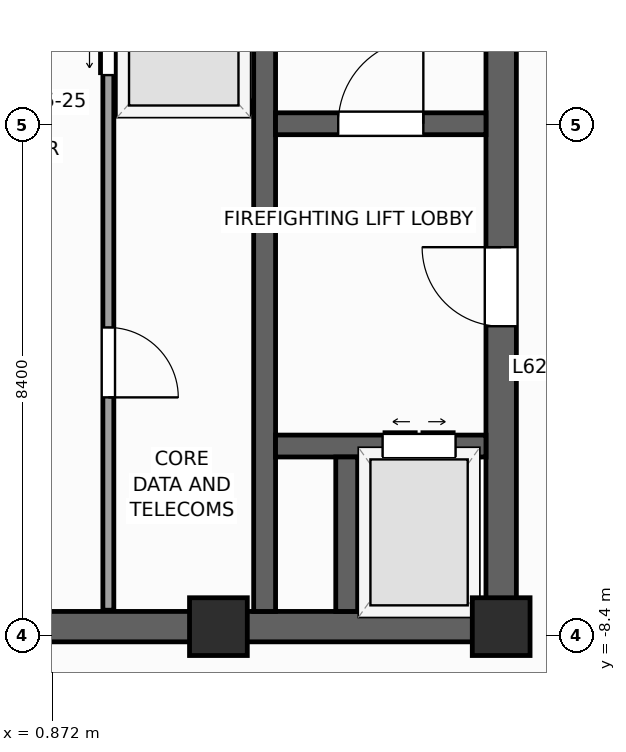
"""IFC4 building model, lengths in metres.
Left out: names, types, materials, properties, quantities, classifications, styles, units other than length and angle.
Written with IfcOpenShell. Run it as: python <this file> out.ifc"""

import sys

from ifc_helpers import new_model, si_unit, direction, frame, frame_2d, origin, origin_2d, place, context, subcontext, project, spatial, rectangle, extrude, source, transform, mapped, element, fill, save


model = new_model("IFC4")
c1 = context("Model", 3, precision=1e-05, world=origin(), true_north=direction((0.0, 1.0)))
c2 = subcontext(c1, "Body", "Model", "MODEL_VIEW")
j1 = project(units=[si_unit("LENGTHUNIT", "METRE"), si_unit("PLANEANGLEUNIT", "RADIAN")], contexts=[c1])
p1 = place(None, origin())
s1 = spatial("IfcSite", under=j1, at=p1, CompositionType="ELEMENT")
p2 = place(p1, origin())
s2 = spatial("IfcBuilding", under=s1, at=p2, CompositionType="ELEMENT")
p3 = place(p2, frame((0.0, 0.0, 256.3)))
s3 = spatial("IfcBuildingStorey", under=s2, at=p3, CompositionType="ELEMENT", Elevation=256.3)
p4 = place(p3, frame((-8.5, -8.25, 0.0), z_axis=(0.0, 0.0, 1.0), x_axis=(1.0, 0.0, 0.0)))
e1 = element("IfcWall", 1, at=p4, inside=s3, PredefinedType="SHEAR", context=c2, shape_type="SweptSolid", body=[
    extrude(rectangle(XDim=17.0, YDim=0.5, at=frame_2d((8.5, 0.0))), origin(), (0.0, 0.0, 1.0), 3.9),
])
p5 = place(p4, frame((7.85, 0.0, 0.0)))
e2 = element("IfcOpeningElement", 2, at=p5, cuts=e1, PredefinedType="OPENING", context=c2, shape_type="SweptSolid", body=[
    extrude(rectangle(XDim=1.3, YDim=2.2, at=frame_2d((0.65, 1.1))), frame((0.0, 0.26, 0.0), z_axis=(0.0, -1.0, 0.0), x_axis=(1.0, 0.0, 0.0)), (0.0, 0.0, 1.0), 0.52),
])
p6 = place(p3, frame((8.25, -8.0, 0.0), z_axis=(0.0, 0.0, 1.0), x_axis=(0.0, 1.0, 0.0)))
e3 = element("IfcWall", 3, at=p6, inside=s3, PredefinedType="SHEAR", context=c2, shape_type="SweptSolid", body=[
    extrude(rectangle(XDim=16.0, YDim=0.5, at=frame_2d((8.0, 0.0))), origin(), (0.0, 0.0, 1.0), 3.9),
])
p7 = place(p6, frame((4.69, 0.0, 0.0)))
e4 = element("IfcOpeningElement", 4, at=p7, cuts=e3, PredefinedType="OPENING", context=c2, shape_type="SweptSolid", body=[
    extrude(rectangle(XDim=1.3, YDim=2.2, at=frame_2d((0.65, 1.1))), frame((0.0, 0.26, 0.0), z_axis=(0.0, -1.0, 0.0), x_axis=(1.0, 0.0, 0.0)), (0.0, 0.0, 1.0), 0.52),
])
p8 = place(p3, frame((4.36, -8.0, 0.0), z_axis=(0.0, 0.0, 1.0), x_axis=(0.0, 1.0, 0.0)))
e5 = element("IfcWall", 5, at=p8, inside=s3, PredefinedType="SHEAR", context=c2, shape_type="SweptSolid", body=[
    extrude(rectangle(XDim=16.0, YDim=0.36, at=frame_2d((8.0, 0.0))), origin(), (0.0, 0.0, 1.0), 3.9),
])
p9 = place(p3, frame((4.54, 0.02, 0.0), z_axis=(0.0, 0.0, 1.0), x_axis=(1.0, 0.0, 0.0)))
e6 = element("IfcWall", 6, at=p9, inside=s3, PredefinedType="SHEAR", context=c2, shape_type="SweptSolid", body=[
    extrude(rectangle(XDim=3.46, YDim=0.36, at=frame_2d((1.73, 0.0))), origin(), (0.0, 0.0, 1.0), 3.9),
])
p10 = place(p9, frame((1.03, 0.0, 0.0)))
e7 = element("IfcOpeningElement", 7, at=p10, cuts=e6, PredefinedType="OPENING", context=c2, shape_type="SweptSolid", body=[
    extrude(rectangle(XDim=1.4, YDim=2.2, at=frame_2d((0.7, 1.1))), frame((0.0, 0.19, 0.0), z_axis=(0.0, -1.0, 0.0), x_axis=(1.0, 0.0, 0.0)), (0.0, 0.0, 1.0), 0.38),
])
p11 = place(p3, frame((4.54, -5.28, 0.0), z_axis=(0.0, 0.0, 1.0), x_axis=(1.0, 0.0, 0.0)))
e8 = element("IfcWall", 8, at=p11, inside=s3, PredefinedType="SHEAR", context=c2, shape_type="SweptSolid", body=[
    extrude(rectangle(XDim=3.46, YDim=0.36, at=frame_2d((1.73, 0.0))), origin(), (0.0, 0.0, 1.0), 3.9),
])
p12 = place(p11, frame((1.76, 0.0, 0.0)))
e9 = element("IfcOpeningElement", 9, at=p12, cuts=e8, PredefinedType="OPENING", context=c2, shape_type="SweptSolid", body=[
    extrude(rectangle(XDim=1.2, YDim=2.25, at=frame_2d((0.6, 1.125))), frame((0.0, 0.19, 0.0), z_axis=(0.0, -1.0, 0.0), x_axis=(1.0, 0.0, 0.0)), (0.0, 0.0, 1.0), 0.38),
])
p13 = place(p3, frame((5.71, -8.0, 0.0), z_axis=(0.0, 0.0, 1.0), x_axis=(0.0, 1.0, 0.0)))
e10 = element("IfcWall", 10, at=p13, inside=s3, PredefinedType="SHEAR", context=c2, shape_type="SweptSolid", body=[
    extrude(rectangle(XDim=2.54, YDim=0.36, at=frame_2d((1.27, 0.0))), origin(), (0.0, 0.0, 1.0), 3.9),
])
m1 = source(origin(), c2, "Body", "SweptSolid", [
    extrude(rectangle(XDim=0.95, YDim=0.95, at=origin_2d()), origin(), (0.0, 0.0, 1.0), 3.9),
])
for number, where, z_axis, x_axis in (
    (11, (8.25, -8.25, 0.0), (0.0, 0.0, 1.0), (1.0, 0.0, 0.0)),
    (12, (3.6, -8.25, 0.0), (0.0, 0.0, 1.0), (1.0, 0.0, 0.0)),
):
    element("IfcColumn", number, at=place(p3, frame(where, z_axis=z_axis, x_axis=x_axis)), inside=s3, PredefinedType="PILASTER", context=c2, shape_type="MappedRepresentation", body=[
        mapped(m1, transform((0.0, 0.0, 0.0), scale=1.0)),
    ])
p14 = place(p3, frame((6.733, -29.154, 0.0), z_axis=(0.0, 0.0, 1.0), x_axis=(0.629325378072, 0.77714192302, 0.0)))
e13 = element("IfcWall", 13, at=p14, inside=s3, PredefinedType="STANDARD", context=c2, shape_type="SweptSolid", body=[
    extrude(rectangle(XDim=36.84, YDim=0.34, at=frame_2d((18.42, 0.0))), origin(), (0.0, 0.0, 1.0), 2.02),
])
p15 = place(p14, frame((23.495, 0.0, 0.0)))
e14 = element("IfcOpeningElement", 14, at=p15, cuts=e13, PredefinedType="OPENING", context=c2, shape_type="SweptSolid", body=[
    extrude(rectangle(XDim=1.05, YDim=2.02, at=frame_2d((0.525, 1.01))), frame((0.0, 0.18, 0.0), z_axis=(0.0, -1.0, 0.0), x_axis=(1.0, 0.0, 0.0)), (0.0, 0.0, 1.0), 0.36),
])
p16 = place(p14, frame((3.421, 0.0, 0.49)))
e15 = element("IfcOpeningElement", 15, at=p16, cuts=e13, PredefinedType="OPENING", context=c2, shape_type="SweptSolid", body=[
    extrude(rectangle(XDim=2.0, YDim=1.45, at=frame_2d((1.0, 0.725))), frame((0.0, 0.18, 0.0), z_axis=(0.0, -1.0, 0.0), x_axis=(1.0, 0.0, 0.0)), (0.0, 0.0, 1.0), 0.36),
])
p17 = place(p14, frame((11.184, 0.0, 0.49)))
e16 = element("IfcOpeningElement", 16, at=p17, cuts=e13, PredefinedType="OPENING", context=c2, shape_type="SweptSolid", body=[
    extrude(rectangle(XDim=2.0, YDim=1.45, at=frame_2d((1.0, 0.725))), frame((0.0, 0.18, 0.0), z_axis=(0.0, -1.0, 0.0), x_axis=(1.0, 0.0, 0.0)), (0.0, 0.0, 1.0), 0.36),
])
p18 = place(p14, frame((15.183, 0.0, 0.49)))
e17 = element("IfcOpeningElement", 17, at=p18, cuts=e13, PredefinedType="OPENING", context=c2, shape_type="SweptSolid", body=[
    extrude(rectangle(XDim=2.0, YDim=1.45, at=frame_2d((1.0, 0.725))), frame((0.0, 0.18, 0.0), z_axis=(0.0, -1.0, 0.0), x_axis=(1.0, 0.0, 0.0)), (0.0, 0.0, 1.0), 0.36),
])
p19 = place(p14, frame((26.301, 0.0, 0.49)))
e18 = element("IfcOpeningElement", 18, at=p19, cuts=e13, PredefinedType="OPENING", context=c2, shape_type="SweptSolid", body=[
    extrude(rectangle(XDim=2.0, YDim=1.45, at=frame_2d((1.0, 0.725))), frame((0.0, 0.18, 0.0), z_axis=(0.0, -1.0, 0.0), x_axis=(1.0, 0.0, 0.0)), (0.0, 0.0, 1.0), 0.36),
])
p20 = place(p14, frame((30.682, 0.0, 0.49)))
e19 = element("IfcOpeningElement", 19, at=p20, cuts=e13, PredefinedType="OPENING", context=c2, shape_type="SweptSolid", body=[
    extrude(rectangle(XDim=2.0, YDim=1.45, at=frame_2d((1.0, 0.725))), frame((0.0, 0.18, 0.0), z_axis=(0.0, -1.0, 0.0), x_axis=(1.0, 0.0, 0.0)), (0.0, 0.0, 1.0), 0.36),
])
p21 = place(p3, frame((1.79, -7.98, 0.0), z_axis=(0.0, 0.0, 1.0), x_axis=(0.0, 1.0, 0.0)))
e20 = element("IfcWall", 20, at=p21, inside=s3, PredefinedType="PARTITIONING", context=c2, shape_type="SweptSolid", body=[
    extrude(rectangle(XDim=12.38, YDim=0.18, at=frame_2d((6.19, 0.0))), origin(), (0.0, 0.0, 1.0), 3.5),
])
p22 = place(p21, frame((8.8, 0.0, 0.0)))
e21 = element("IfcOpeningElement", 21, at=p22, cuts=e20, PredefinedType="OPENING", context=c2, shape_type="SweptSolid", body=[
    extrude(rectangle(XDim=1.1, YDim=2.2, at=frame_2d((0.55, 1.1))), frame((0.0, 0.1, 0.0), z_axis=(0.0, -1.0, 0.0), x_axis=(1.0, 0.0, 0.0)), (0.0, 0.0, 1.0), 0.2),
])
p23 = place(p21, frame((10.86, 0.0, 0.0)))
e22 = element("IfcOpeningElement", 22, at=p23, cuts=e20, PredefinedType="OPENING", context=c2, shape_type="SweptSolid", body=[
    extrude(rectangle(XDim=1.1, YDim=2.2, at=frame_2d((0.55, 1.1))), frame((0.0, 0.1, 0.0), z_axis=(0.0, -1.0, 0.0), x_axis=(1.0, 0.0, 0.0)), (0.0, 0.0, 1.0), 0.2),
])
p24 = place(p21, frame((3.5, 0.0, 0.0)))
e23 = element("IfcOpeningElement", 23, at=p24, cuts=e20, PredefinedType="OPENING", context=c2, shape_type="SweptSolid", body=[
    extrude(rectangle(XDim=1.15, YDim=2.25, at=frame_2d((0.575, 1.125))), frame((0.0, 0.1, 0.0), z_axis=(0.0, -1.0, 0.0), x_axis=(1.0, 0.0, 0.0)), (0.0, 0.0, 1.0), 0.2),
])
p25 = place(p3, frame((1.89, 0.3, 0.0), z_axis=(0.0, 0.0, 1.0), x_axis=(1.0, 0.0, 0.0)))
e24 = element("IfcWall", 24, at=p25, inside=s3, PredefinedType="PARTITIONING", context=c2, shape_type="SweptSolid", body=[
    extrude(rectangle(XDim=2.28, YDim=0.18, at=frame_2d((1.14, 0.0))), origin(), (0.0, 0.0, 1.0), 3.5),
])
m2 = source(origin(), c2, "Body", "SweptSolid", [
    extrude(rectangle(XDim=1.4, YDim=2.2, at=frame_2d((0.7, 1.1))), frame((0.0, 0.025, 0.0), z_axis=(0.0, -1.0, 0.0), x_axis=(1.0, 0.0, 0.0)), (0.0, 0.0, 1.0), 0.05),
])
p26 = place(p10, origin())
e25 = element("IfcDoor", 25, at=p26, inside=s3, OperationType="SINGLE_SWING_RIGHT", PredefinedType="DOOR", context=c2, shape_type="MappedRepresentation", body=[
    mapped(m2, transform((0.0, 0.0, 0.0), scale=1.0)),
])
fill(e7, e25)
m3 = source(origin(), c2, "Body", "SweptSolid", [
    extrude(rectangle(XDim=1.3, YDim=2.2, at=frame_2d((0.65, 1.1))), frame((0.0, 0.025, 0.0), z_axis=(0.0, -1.0, 0.0), x_axis=(1.0, 0.0, 0.0)), (0.0, 0.0, 1.0), 0.05),
])
p27 = place(p7, origin())
e26 = element("IfcDoor", 26, at=p27, inside=s3, OperationType="SINGLE_SWING_RIGHT", PredefinedType="DOOR", context=c2, shape_type="MappedRepresentation", body=[
    mapped(m3, transform((0.0, 0.0, 0.0), scale=1.0)),
])
fill(e4, e26)
m4 = source(origin(), c2, "Body", "SweptSolid", [
    extrude(rectangle(XDim=1.2, YDim=2.25, at=frame_2d((0.6, 1.125))), frame((0.0, 0.025, 0.0), z_axis=(0.0, -1.0, 0.0), x_axis=(1.0, 0.0, 0.0)), (0.0, 0.0, 1.0), 0.05),
])
p28 = place(p12, origin())
e27 = element("IfcDoor", 27, at=p28, inside=s3, OperationType="DOUBLE_DOOR_SLIDING", PredefinedType="DOOR", context=c2, shape_type="MappedRepresentation", body=[
    mapped(m4, transform((0.0, 0.0, 0.0), scale=1.0)),
])
fill(e9, e27)
m5 = source(origin(), c2, "Body", "SweptSolid", [
    extrude(rectangle(XDim=1.1, YDim=2.2, at=frame_2d((0.55, 1.1))), frame((0.0, 0.025, 0.0), z_axis=(0.0, -1.0, 0.0), x_axis=(1.0, 0.0, 0.0)), (0.0, 0.0, 1.0), 0.05),
])
p29 = place(p22, origin())
e28 = element("IfcDoor", 28, at=p29, inside=s3, OperationType="DOUBLE_DOOR_SLIDING", PredefinedType="DOOR", context=c2, shape_type="MappedRepresentation", body=[
    mapped(m5, transform((0.0, 0.0, 0.0), scale=1.0)),
])
fill(e21, e28)
m6 = source(origin(), c2, "Body", "SweptSolid", [
    extrude(rectangle(XDim=1.15, YDim=2.25, at=frame_2d((0.575, 1.125))), frame((0.0, 0.025, 0.0), z_axis=(0.0, -1.0, 0.0), x_axis=(1.0, 0.0, 0.0)), (0.0, 0.0, 1.0), 0.05),
])
p30 = place(p24, frame((1.15, 0.0, 0.0), z_axis=(0.0, 0.0, 1.0), x_axis=(-1.0, 0.0, 0.0)))
e29 = element("IfcDoor", 29, at=p30, inside=s3, OperationType="SINGLE_SWING_LEFT", PredefinedType="DOOR", context=c2, shape_type="MappedRepresentation", body=[
    mapped(m6, transform((0.0, 0.0, 0.0), scale=1.0)),
])
fill(e23, e29)
save(model, sys.argv[1])
